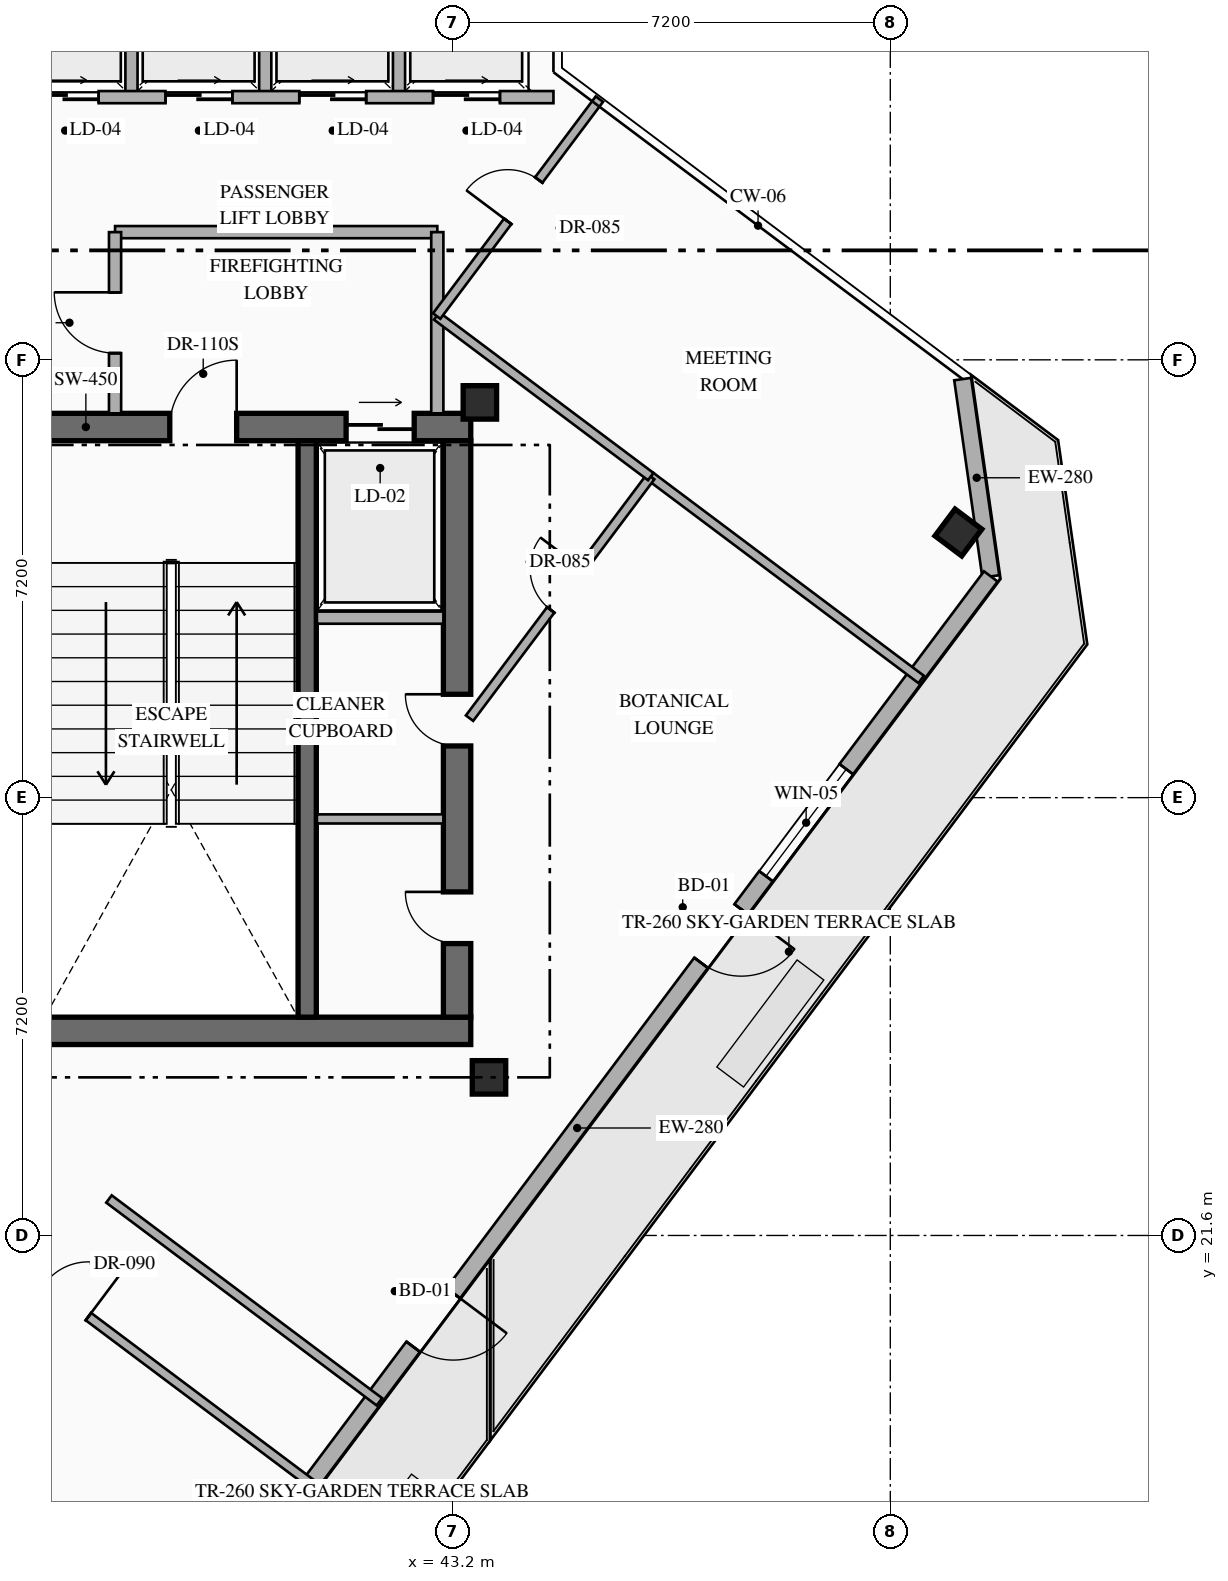
"""IFC4 building model, lengths in metres.
Left out: names, types, materials, properties, quantities, classifications, styles, units other than length and angle.
Written with IfcOpenShell. Run it as: python <this file> out.ifc"""

import sys

from ifc_helpers import new_model, si_unit, direction, frame, frame_2d, origin, origin_2d, place, context, subcontext, project, spatial, rectangle, hollow_rectangle, extrude, element, fill, save


model = new_model("IFC4")
c1 = context("Model", 3, precision=1e-05, world=origin(), true_north=direction((0.0, 1.0)))
c2 = subcontext(c1, "Body", "Model", "MODEL_VIEW")
j1 = project(units=[si_unit("LENGTHUNIT", "METRE"), si_unit("PLANEANGLEUNIT", "RADIAN")], contexts=[c1])
p1 = place(None, origin())
s1 = spatial("IfcSite", under=j1, at=p1, CompositionType="ELEMENT")
p2 = place(p1, origin())
s2 = spatial("IfcBuilding", under=s1, at=p2, CompositionType="ELEMENT")
p3 = place(p2, frame((0.0, 0.0, 281.95)))
s3 = spatial("IfcBuildingStorey", under=s2, at=p3, CompositionType="ELEMENT", Elevation=281.95)
p4 = place(p3, frame((36.04, 24.965, 0.0), z_axis=(0.0, 0.0, 1.0), x_axis=(1.0, 0.0, 0.0)))
e1 = element("IfcWall", 1, at=p4, inside=s3, PredefinedType="SHEAR", context=c2, shape_type="SweptSolid", body=[
    extrude(rectangle(XDim=7.46, YDim=0.45, at=frame_2d((3.73, 0.0))), origin(), (0.0, 0.0, 1.0), 4.0),
])
p5 = place(p3, frame((36.04, 34.895, 0.0), z_axis=(0.0, 0.0, 1.0), x_axis=(1.0, 0.0, 0.0)))
e2 = element("IfcWall", 2, at=p5, inside=s3, PredefinedType="SHEAR", context=c2, shape_type="SweptSolid", body=[
    extrude(rectangle(XDim=7.46, YDim=0.45, at=frame_2d((3.73, 0.0))), origin(), (0.0, 0.0, 1.0), 4.0),
])
p6 = place(p5, frame((2.51, 0.0, 0.0)))
e3 = element("IfcOpeningElement", 3, at=p6, cuts=e2, PredefinedType="OPENING", context=c2, shape_type="SweptSolid", body=[
    extrude(rectangle(XDim=1.1, YDim=2.2, at=frame_2d((0.55, 1.1))), frame((0.0, 0.235, 0.0), z_axis=(0.0, -1.0, 0.0), x_axis=(1.0, 0.0, 0.0)), (0.0, 0.0, 1.0), 0.47),
])
p7 = place(p5, frame((5.41, 0.0, 0.0)))
e4 = element("IfcOpeningElement", 4, at=p7, cuts=e2, PredefinedType="OPENING", context=c2, shape_type="SweptSolid", body=[
    extrude(rectangle(XDim=1.12, YDim=2.15, at=frame_2d((0.56, 1.075))), frame((0.0, 0.235, 0.0), z_axis=(0.0, -1.0, 0.0), x_axis=(1.0, 0.0, 0.0)), (0.0, 0.0, 1.0), 0.47),
])
p8 = place(p3, frame((43.275, 25.19, 0.0), z_axis=(0.0, 0.0, 1.0), x_axis=(0.0, 1.0, 0.0)))
e5 = element("IfcWall", 5, at=p8, inside=s3, PredefinedType="SHEAR", context=c2, shape_type="SweptSolid", body=[
    extrude(rectangle(XDim=9.48, YDim=0.45, at=frame_2d((4.74, 0.0))), origin(), (0.0, 0.0, 1.0), 4.0),
])
p9 = place(p8, frame((1.21, 0.0, 0.0)))
e6 = element("IfcOpeningElement", 6, at=p9, cuts=e5, PredefinedType="OPENING", context=c2, shape_type="SweptSolid", body=[
    extrude(rectangle(XDim=0.85, YDim=2.08, at=frame_2d((0.425, 1.04))), frame((0.0, 0.235, 0.0), z_axis=(0.0, -1.0, 0.0), x_axis=(1.0, 0.0, 0.0)), (0.0, 0.0, 1.0), 0.47),
])
p10 = place(p8, frame((4.46, 0.0, 0.0)))
e7 = element("IfcOpeningElement", 7, at=p10, cuts=e5, PredefinedType="OPENING", context=c2, shape_type="SweptSolid", body=[
    extrude(rectangle(XDim=0.85, YDim=2.08, at=frame_2d((0.425, 1.04))), frame((0.0, 0.235, 0.0), z_axis=(0.0, -1.0, 0.0), x_axis=(1.0, 0.0, 0.0)), (0.0, 0.0, 1.0), 0.47),
])
p11 = place(p3, frame((40.81, 25.19, 0.0), z_axis=(0.0, 0.0, 1.0), x_axis=(0.0, 1.0, 0.0)))
e8 = element("IfcWall", 8, at=p11, inside=s3, PredefinedType="SHEAR", context=c2, shape_type="SweptSolid", body=[
    extrude(rectangle(XDim=9.48, YDim=0.3, at=frame_2d((4.74, 0.0))), origin(), (0.0, 0.0, 1.0), 4.0),
])
for number, where, z_axis, x_axis in (
    (9, (43.8, 24.2, 0.0), (0.0, 0.0, 1.0), (1.0, 0.0, 0.0)),
    (10, (43.65, 35.3, 0.0), (0.0, 0.0, 1.0), (1.0, 0.0, 0.0)),
    (11, (51.52, 33.16, 0.0), (0.0, 0.0, 1.0), (0.8, -0.6, 0.0)),
):
    element("IfcColumn", number, at=place(p3, frame(where, z_axis=z_axis, x_axis=x_axis)), inside=s3, PredefinedType="COLUMN", context=c2, shape_type="SweptSolid", body=[
        extrude(hollow_rectangle(XDim=0.55, YDim=0.55, WallThickness=0.022, at=origin_2d()), origin(), (0.0, 0.0, 1.0), 4.0),
    ])
p12 = place(p3, frame((51.59, 35.683, 0.0), z_axis=(0.0, 0.0, 1.0), x_axis=(0.141212810973, -0.989979263428, 0.0)))
e12 = element("IfcWall", 12, at=p12, inside=s3, PredefinedType="STANDARD", context=c2, shape_type="SweptSolid", body=[
    extrude(rectangle(XDim=3.278, YDim=0.28, at=frame_2d((1.639, 0.0))), origin(), (0.0, 0.0, 1.0), 3.75),
])
p13 = place(p3, frame((52.053, 32.438, 0.0), z_axis=(0.0, 0.0, 1.0), x_axis=(-0.599970072971, -0.800022444397, 0.0)))
e13 = element("IfcWall", 13, at=p13, inside=s3, PredefinedType="STANDARD", context=c2, shape_type="SweptSolid", body=[
    extrude(rectangle(XDim=20.885, YDim=0.28, at=frame_2d((10.442, 0.0))), origin(), (0.0, 0.0, 1.0), 3.75),
])
p14 = place(p13, frame((14.734, 0.0, 0.0)))
e14 = element("IfcOpeningElement", 14, at=p14, cuts=e13, PredefinedType="OPENING", context=c2, shape_type="SweptSolid", body=[
    extrude(rectangle(XDim=1.1, YDim=2.2, at=frame_2d((0.55, 1.1))), frame((0.0, 0.15, 0.0), z_axis=(0.0, -1.0, 0.0), x_axis=(1.0, 0.0, 0.0)), (0.0, 0.0, 1.0), 0.3),
])
p15 = place(p13, frame((6.842, 0.0, 0.0)))
e15 = element("IfcOpeningElement", 15, at=p15, cuts=e13, PredefinedType="OPENING", context=c2, shape_type="SweptSolid", body=[
    extrude(rectangle(XDim=1.1, YDim=2.2, at=frame_2d((0.55, 1.1))), frame((0.0, 0.15, 0.0), z_axis=(0.0, -1.0, 0.0), x_axis=(1.0, 0.0, 0.0)), (0.0, 0.0, 1.0), 0.3),
])
p16 = place(p13, frame((3.962, 0.0, 0.75)))
e16 = element("IfcOpeningElement", 16, at=p16, cuts=e13, PredefinedType="OPENING", context=c2, shape_type="SweptSolid", body=[
    extrude(rectangle(XDim=2.2, YDim=2.2, at=frame_2d((1.1, 1.1))), frame((0.0, 0.15, 0.0), z_axis=(0.0, -1.0, 0.0), x_axis=(1.0, 0.0, 0.0)), (0.0, 0.0, 1.0), 0.3),
])
p17 = place(p3, frame((40.97, 31.76, 0.0), z_axis=(0.0, 0.0, 1.0), x_axis=(1.0, 0.0, 0.0)))
e17 = element("IfcWall", 17, at=p17, inside=s3, PredefinedType="STANDARD", context=c2, shape_type="SweptSolid", body=[
    extrude(rectangle(XDim=2.08, YDim=0.2, at=frame_2d((1.04, 0.0))), origin(), (0.0, 0.0, 1.0), 3.75),
])
p18 = place(p3, frame((40.97, 28.45, 0.0), z_axis=(0.0, 0.0, 1.0), x_axis=(1.0, 0.0, 0.0)))
e18 = element("IfcWall", 18, at=p18, inside=s3, PredefinedType="PARTITIONING", context=c2, shape_type="SweptSolid", body=[
    extrude(rectangle(XDim=2.08, YDim=0.15, at=frame_2d((1.04, 0.0))), origin(), (0.0, 0.0, 1.0), 3.75),
])
p19 = place(p3, frame((37.65, 38.1, 0.0), z_axis=(0.0, 0.0, 1.0), x_axis=(1.0, 0.0, 0.0)))
e19 = element("IfcWall", 19, at=p19, inside=s3, PredefinedType="STANDARD", context=c2, shape_type="SweptSolid", body=[
    extrude(rectangle(XDim=5.3, YDim=0.2, at=frame_2d((2.65, 0.0))), origin(), (0.0, 0.0, 1.0), 3.75),
])
p20 = place(p3, frame((42.95, 35.12, 0.0), z_axis=(0.0, 0.0, 1.0), x_axis=(0.0, 1.0, 0.0)))
e20 = element("IfcWall", 20, at=p20, inside=s3, PredefinedType="STANDARD", context=c2, shape_type="SweptSolid", body=[
    extrude(rectangle(XDim=2.98, YDim=0.2, at=frame_2d((1.49, 0.0))), origin(), (0.0, 0.0, 1.0), 3.75),
])
p21 = place(p3, frame((37.65, 35.12, 0.0), z_axis=(0.0, 0.0, 1.0), x_axis=(0.0, 1.0, 0.0)))
e21 = element("IfcWall", 21, at=p21, inside=s3, PredefinedType="STANDARD", context=c2, shape_type="SweptSolid", body=[
    extrude(rectangle(XDim=2.98, YDim=0.2, at=frame_2d((1.49, 0.0))), origin(), (0.0, 0.0, 1.0), 3.75),
])
p22 = place(p21, frame((0.99, 0.0, 0.0)))
e22 = element("IfcOpeningElement", 22, at=p22, cuts=e21, PredefinedType="OPENING", context=c2, shape_type="SweptSolid", body=[
    extrude(rectangle(XDim=1.0, YDim=2.2, at=frame_2d((0.5, 1.1))), frame((0.0, 0.11, 0.0), z_axis=(0.0, -1.0, 0.0), x_axis=(1.0, 0.0, 0.0)), (0.0, 0.0, 1.0), 0.22),
])
for number, where, z_axis, x_axis in (
    (23, (37.92, 40.32, 0.0), (0.0, 0.0, 1.0), (0.0, 1.0, 0.0)),
    (24, (40.12, 40.32, 0.0), (0.0, 0.0, 1.0), (0.0, 1.0, 0.0)),
    (25, (42.32, 40.32, 0.0), (0.0, 0.0, 1.0), (0.0, 1.0, 0.0)),
):
    element("IfcWall", number, at=place(p3, frame(where, z_axis=z_axis, x_axis=x_axis)), inside=s3, PredefinedType="STANDARD", context=c2, shape_type="SweptSolid", body=[
        extrude(rectangle(XDim=2.16, YDim=0.2, at=frame_2d((1.08, 0.0))), origin(), (0.0, 0.0, 1.0), 3.75),
    ])
p23 = place(p3, frame((35.75, 40.32, 0.0), z_axis=(0.0, 0.0, 1.0), x_axis=(1.0, 0.0, 0.0)))
e26 = element("IfcWall", 26, at=p23, inside=s3, PredefinedType="STANDARD", context=c2, shape_type="SweptSolid", body=[
    extrude(rectangle(XDim=9.11, YDim=0.2, at=frame_2d((4.555, 0.0))), origin(), (0.0, 0.0, 1.0), 3.75),
])
p24 = place(p23, frame((0.53, 0.0, 0.0)))
e27 = element("IfcOpeningElement", 27, at=p24, cuts=e26, PredefinedType="OPENING", context=c2, shape_type="SweptSolid", body=[
    extrude(rectangle(XDim=1.1, YDim=2.18, at=frame_2d((0.55, 1.09))), frame((0.0, 0.11, 0.0), z_axis=(0.0, -1.0, 0.0), x_axis=(1.0, 0.0, 0.0)), (0.0, 0.0, 1.0), 0.22),
])
p25 = place(p23, frame((2.73, 0.0, 0.0)))
e28 = element("IfcOpeningElement", 28, at=p25, cuts=e26, PredefinedType="OPENING", context=c2, shape_type="SweptSolid", body=[
    extrude(rectangle(XDim=1.1, YDim=2.18, at=frame_2d((0.55, 1.09))), frame((0.0, 0.11, 0.0), z_axis=(0.0, -1.0, 0.0), x_axis=(1.0, 0.0, 0.0)), (0.0, 0.0, 1.0), 0.22),
])
p26 = place(p23, frame((4.93, 0.0, 0.0)))
e29 = element("IfcOpeningElement", 29, at=p26, cuts=e26, PredefinedType="OPENING", context=c2, shape_type="SweptSolid", body=[
    extrude(rectangle(XDim=1.1, YDim=2.18, at=frame_2d((0.55, 1.09))), frame((0.0, 0.11, 0.0), z_axis=(0.0, -1.0, 0.0), x_axis=(1.0, 0.0, 0.0)), (0.0, 0.0, 1.0), 0.22),
])
p27 = place(p23, frame((7.13, 0.0, 0.0)))
e30 = element("IfcOpeningElement", 30, at=p27, cuts=e26, PredefinedType="OPENING", context=c2, shape_type="SweptSolid", body=[
    extrude(rectangle(XDim=1.1, YDim=2.18, at=frame_2d((0.55, 1.09))), frame((0.0, 0.11, 0.0), z_axis=(0.0, -1.0, 0.0), x_axis=(1.0, 0.0, 0.0)), (0.0, 0.0, 1.0), 0.22),
])
p28 = place(p3, frame((28.18, 27.04, 0.0), z_axis=(0.0, 0.0, 1.0), x_axis=(0.80000367127, -0.599995104942, 0.0)))
e31 = element("IfcWall", 31, at=p28, inside=s3, PredefinedType="PARTITIONING", context=c2, shape_type="SweptSolid", body=[
    extrude(rectangle(XDim=15.96, YDim=0.15, at=frame_2d((7.98, 0.0))), origin(), (0.0, 0.0, 1.0), 3.75),
])
p29 = place(p28, frame((10.39, 0.0, 0.0)))
e32 = element("IfcOpeningElement", 32, at=p29, cuts=e31, PredefinedType="OPENING", context=c2, shape_type="SweptSolid", body=[
    extrude(rectangle(XDim=0.9, YDim=2.15, at=frame_2d((0.45, 1.075))), frame((0.0, 0.085, 0.0), z_axis=(0.0, -1.0, 0.0), x_axis=(1.0, 0.0, 0.0)), (0.0, 0.0, 1.0), 0.17),
])
for number, where, z_axis, x_axis in (
    (33, (37.55, 22.2, 0.0), (0.0, 0.0, 1.0), (0.8, -0.6, 0.0)),
    (34, (46.46, 34.08, 0.0), (0.0, 0.0, 1.0), (0.8, -0.6, 0.0)),
):
    element("IfcWall", number, at=place(p3, frame(where, z_axis=z_axis, x_axis=x_axis)), inside=s3, PredefinedType="PARTITIONING", context=c2, shape_type="SweptSolid", body=[
        extrude(rectangle(XDim=5.56, YDim=0.15, at=frame_2d((2.78, 0.0))), origin(), (0.0, 0.0, 1.0), 3.75),
    ])
p30 = place(p3, frame((43.48, 30.107, 0.0), z_axis=(0.0, 0.0, 1.0), x_axis=(0.600015730265, 0.799988202059, 0.0)))
e35 = element("IfcWall", 35, at=p30, inside=s3, PredefinedType="PARTITIONING", context=c2, shape_type="SweptSolid", body=[
    extrude(rectangle(XDim=4.967, YDim=0.15, at=frame_2d((2.483, 0.0))), origin(), (0.0, 0.0, 1.0), 3.75),
])
p31 = place(p30, frame((2.226, 0.0, 0.0)))
e36 = element("IfcOpeningElement", 36, at=p31, cuts=e35, PredefinedType="OPENING", context=c2, shape_type="SweptSolid", body=[
    extrude(rectangle(XDim=0.85, YDim=2.08, at=frame_2d((0.425, 1.04))), frame((0.0, 0.085, 0.0), z_axis=(0.0, -1.0, 0.0), x_axis=(1.0, 0.0, 0.0)), (0.0, 0.0, 1.0), 0.17),
])
p32 = place(p3, frame((42.94, 36.72, 0.0), z_axis=(0.0, 0.0, 1.0), x_axis=(0.800013316712, -0.599982243973, 0.0)))
e37 = element("IfcWall", 37, at=p32, inside=s3, PredefinedType="PARTITIONING", context=c2, shape_type="SweptSolid", body=[
    extrude(rectangle(XDim=4.4, YDim=0.15, at=frame_2d((2.2, 0.0))), origin(), (0.0, 0.0, 1.0), 3.295),
])
p33 = place(p3, frame((42.94, 36.72, 0.0), z_axis=(0.0, 0.0, 1.0), x_axis=(0.599991241767, 0.8000065686, 0.0)))
e38 = element("IfcWall", 38, at=p33, inside=s3, PredefinedType="PARTITIONING", context=c2, shape_type="SweptSolid", body=[
    extrude(rectangle(XDim=4.46, YDim=0.15, at=frame_2d((2.23, 0.0))), origin(), (0.0, 0.0, 1.0), 3.75),
])
p34 = place(p33, frame((1.947, 0.0, 0.0)))
e39 = element("IfcOpeningElement", 39, at=p34, cuts=e38, PredefinedType="OPENING", context=c2, shape_type="SweptSolid", body=[
    extrude(rectangle(XDim=0.85, YDim=2.08, at=frame_2d((0.425, 1.04))), frame((0.0, 0.085, 0.0), z_axis=(0.0, -1.0, 0.0), x_axis=(1.0, 0.0, 0.0)), (0.0, 0.0, 1.0), 0.17),
])
p35 = place(p14, origin())
e40 = element("IfcDoor", 40, at=p35, inside=s3, OperationType="SINGLE_SWING_LEFT", PredefinedType="DOOR", context=c2, shape_type="SweptSolid", body=[
    extrude(rectangle(XDim=1.1, YDim=2.2, at=frame_2d((0.55, 1.1))), frame((0.0, 0.025, 0.0), z_axis=(0.0, -1.0, 0.0), x_axis=(1.0, 0.0, 0.0)), (0.0, 0.0, 1.0), 0.05),
])
fill(e14, e40)
p36 = place(p15, origin())
e41 = element("IfcDoor", 41, at=p36, inside=s3, OperationType="SINGLE_SWING_LEFT", PredefinedType="DOOR", context=c2, shape_type="SweptSolid", body=[
    extrude(rectangle(XDim=1.1, YDim=2.2, at=frame_2d((0.55, 1.1))), frame((0.0, 0.025, 0.0), z_axis=(0.0, -1.0, 0.0), x_axis=(1.0, 0.0, 0.0)), (0.0, 0.0, 1.0), 0.05),
])
fill(e15, e41)
p37 = place(p16, origin())
e42 = element("IfcWindow", 42, at=p37, inside=s3, PartitioningType="SINGLE_PANEL", PredefinedType="WINDOW", context=c2, shape_type="SweptSolid", body=[
    extrude(rectangle(XDim=2.2, YDim=2.2, at=frame_2d((1.1, 1.1))), frame((0.0, 0.03, 0.0), z_axis=(0.0, -1.0, 0.0), x_axis=(1.0, 0.0, 0.0)), (0.0, 0.0, 1.0), 0.06),
])
fill(e16, e42)
p38 = place(p6, origin())
e43 = element("IfcDoor", 43, at=p38, inside=s3, OperationType="SINGLE_SWING_RIGHT", PredefinedType="DOOR", context=c2, shape_type="SweptSolid", body=[
    extrude(rectangle(XDim=1.1, YDim=2.2, at=frame_2d((0.55, 1.1))), frame((0.0, 0.025, 0.0), z_axis=(0.0, -1.0, 0.0), x_axis=(1.0, 0.0, 0.0)), (0.0, 0.0, 1.0), 0.05),
])
fill(e3, e43)
p39 = place(p7, origin())
e44 = element("IfcDoor", 44, at=p39, inside=s3, OperationType="SLIDING_TO_RIGHT", PredefinedType="USERDEFINED", context=c2, shape_type="SweptSolid", body=[
    extrude(rectangle(XDim=1.12, YDim=2.15, at=frame_2d((0.56, 1.075))), frame((0.0, 0.025, 0.0), z_axis=(0.0, -1.0, 0.0), x_axis=(1.0, 0.0, 0.0)), (0.0, 0.0, 1.0), 0.05),
])
fill(e4, e44)
p40 = place(p9, origin())
e45 = element("IfcDoor", 45, at=p40, inside=s3, OperationType="SINGLE_SWING_RIGHT", PredefinedType="DOOR", context=c2, shape_type="SweptSolid", body=[
    extrude(rectangle(XDim=0.85, YDim=2.08, at=frame_2d((0.425, 1.04))), frame((0.0, 0.025, 0.0), z_axis=(0.0, -1.0, 0.0), x_axis=(1.0, 0.0, 0.0)), (0.0, 0.0, 1.0), 0.05),
])
fill(e6, e45)
p41 = place(p10, origin())
e46 = element("IfcDoor", 46, at=p41, inside=s3, OperationType="SINGLE_SWING_RIGHT", PredefinedType="DOOR", context=c2, shape_type="SweptSolid", body=[
    extrude(rectangle(XDim=0.85, YDim=2.08, at=frame_2d((0.425, 1.04))), frame((0.0, 0.025, 0.0), z_axis=(0.0, -1.0, 0.0), x_axis=(1.0, 0.0, 0.0)), (0.0, 0.0, 1.0), 0.05),
])
fill(e7, e46)
p42 = place(p22, origin())
e47 = element("IfcDoor", 47, at=p42, inside=s3, OperationType="SINGLE_SWING_RIGHT", PredefinedType="DOOR", context=c2, shape_type="SweptSolid", body=[
    extrude(rectangle(XDim=1.0, YDim=2.2, at=frame_2d((0.5, 1.1))), frame((0.0, 0.025, 0.0), z_axis=(0.0, -1.0, 0.0), x_axis=(1.0, 0.0, 0.0)), (0.0, 0.0, 1.0), 0.05),
])
fill(e22, e47)
p43 = place(p24, origin())
e48 = element("IfcDoor", 48, at=p43, inside=s3, OperationType="SLIDING_TO_RIGHT", PredefinedType="USERDEFINED", context=c2, shape_type="SweptSolid", body=[
    extrude(rectangle(XDim=1.1, YDim=2.18, at=frame_2d((0.55, 1.09))), frame((0.0, 0.025, 0.0), z_axis=(0.0, -1.0, 0.0), x_axis=(1.0, 0.0, 0.0)), (0.0, 0.0, 1.0), 0.05),
])
fill(e27, e48)
p44 = place(p25, origin())
e49 = element("IfcDoor", 49, at=p44, inside=s3, OperationType="SLIDING_TO_RIGHT", PredefinedType="USERDEFINED", context=c2, shape_type="SweptSolid", body=[
    extrude(rectangle(XDim=1.1, YDim=2.18, at=frame_2d((0.55, 1.09))), frame((0.0, 0.025, 0.0), z_axis=(0.0, -1.0, 0.0), x_axis=(1.0, 0.0, 0.0)), (0.0, 0.0, 1.0), 0.05),
])
fill(e28, e49)
p45 = place(p26, origin())
e50 = element("IfcDoor", 50, at=p45, inside=s3, OperationType="SLIDING_TO_RIGHT", PredefinedType="USERDEFINED", context=c2, shape_type="SweptSolid", body=[
    extrude(rectangle(XDim=1.1, YDim=2.18, at=frame_2d((0.55, 1.09))), frame((0.0, 0.025, 0.0), z_axis=(0.0, -1.0, 0.0), x_axis=(1.0, 0.0, 0.0)), (0.0, 0.0, 1.0), 0.05),
])
fill(e29, e50)
p46 = place(p27, origin())
e51 = element("IfcDoor", 51, at=p46, inside=s3, OperationType="SLIDING_TO_RIGHT", PredefinedType="USERDEFINED", context=c2, shape_type="SweptSolid", body=[
    extrude(rectangle(XDim=1.1, YDim=2.18, at=frame_2d((0.55, 1.09))), frame((0.0, 0.025, 0.0), z_axis=(0.0, -1.0, 0.0), x_axis=(1.0, 0.0, 0.0)), (0.0, 0.0, 1.0), 0.05),
])
fill(e30, e51)
p47 = place(p29, origin())
e52 = element("IfcDoor", 52, at=p47, inside=s3, OperationType="SINGLE_SWING_RIGHT", PredefinedType="DOOR", context=c2, shape_type="SweptSolid", body=[
    extrude(rectangle(XDim=0.9, YDim=2.15, at=frame_2d((0.45, 1.075))), frame((0.0, 0.025, 0.0), z_axis=(0.0, -1.0, 0.0), x_axis=(1.0, 0.0, 0.0)), (0.0, 0.0, 1.0), 0.05),
])
fill(e32, e52)
p48 = place(p31, origin())
e53 = element("IfcDoor", 53, at=p48, inside=s3, OperationType="SINGLE_SWING_RIGHT", PredefinedType="DOOR", context=c2, shape_type="SweptSolid", body=[
    extrude(rectangle(XDim=0.85, YDim=2.08, at=frame_2d((0.425, 1.04))), frame((0.0, 0.025, 0.0), z_axis=(0.0, -1.0, 0.0), x_axis=(1.0, 0.0, 0.0)), (0.0, 0.0, 1.0), 0.05),
])
fill(e36, e53)
p49 = place(p34, origin())
e54 = element("IfcDoor", 54, at=p49, inside=s3, OperationType="SINGLE_SWING_LEFT", PredefinedType="DOOR", context=c2, shape_type="SweptSolid", body=[
    extrude(rectangle(XDim=0.85, YDim=2.08, at=frame_2d((0.425, 1.04))), frame((0.0, 0.025, 0.0), z_axis=(0.0, -1.0, 0.0), x_axis=(1.0, 0.0, 0.0)), (0.0, 0.0, 1.0), 0.05),
])
fill(e39, e54)
save(model, sys.argv[1])
